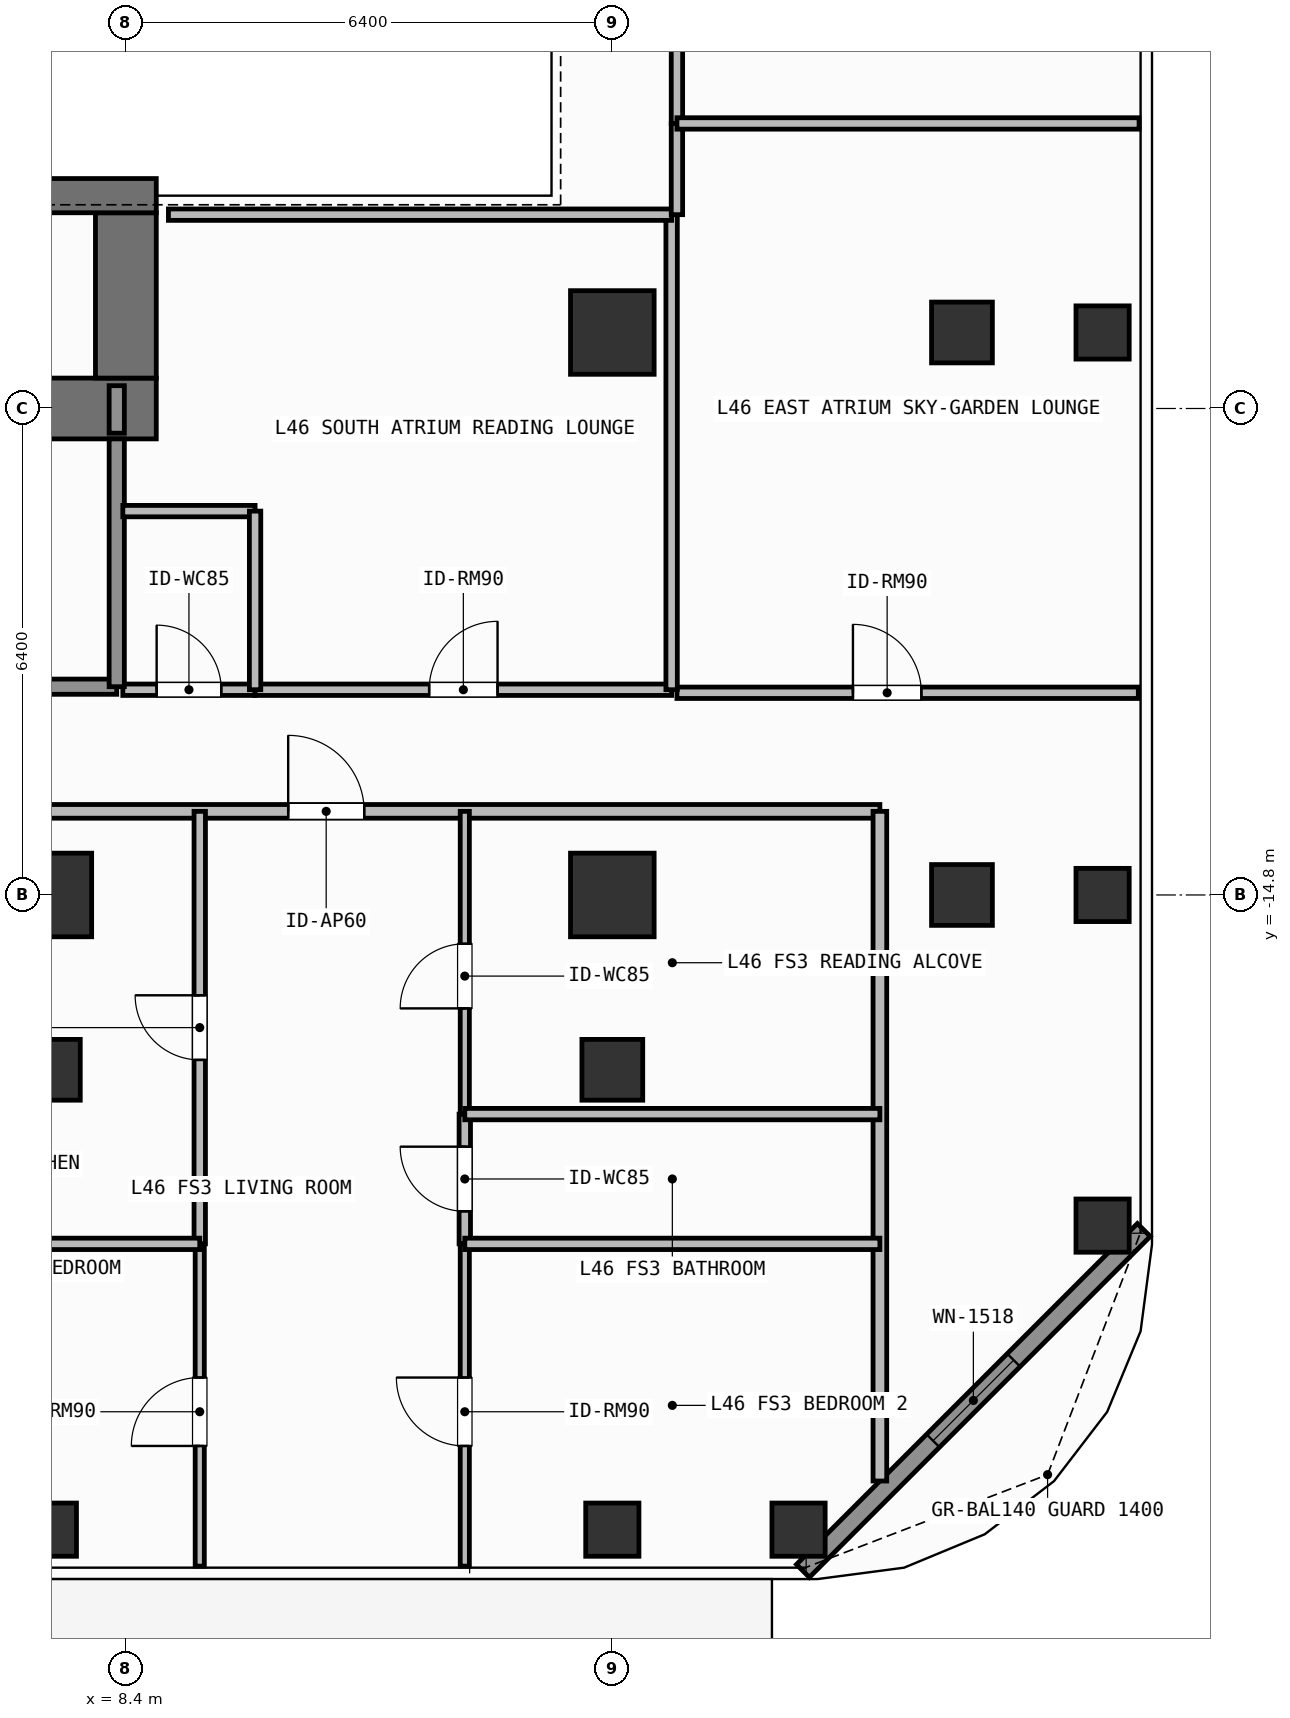
"""IFC4 building model, lengths in metres.
Left out: names, types, materials, properties, quantities, classifications, styles, units other than length and angle.
Written with IfcOpenShell. Run it as: python <this file> out.ifc"""

import sys

from ifc_helpers import new_model, si_unit, direction, frame, frame_2d, origin, origin_2d, place, context, subcontext, project, spatial, rectangle, hollow_rectangle, extrude, element, fill, save


model = new_model("IFC4")
c1 = context("Model", 3, precision=1e-05, world=origin(), true_north=direction((0.0, 1.0)))
c2 = subcontext(c1, "Body", "Model", "MODEL_VIEW")
j1 = project(units=[si_unit("LENGTHUNIT", "METRE"), si_unit("PLANEANGLEUNIT", "RADIAN")], contexts=[c1])
p1 = place(None, origin())
s1 = spatial("IfcSite", under=j1, at=p1, CompositionType="ELEMENT")
p2 = place(p1, origin())
s2 = spatial("IfcBuilding", under=s1, at=p2, CompositionType="ELEMENT")
p3 = place(p2, frame((0.0, 0.0, 187.5)))
s3 = spatial("IfcBuildingStorey", under=s2, at=p3, CompositionType="ELEMENT", Elevation=187.5)
p4 = place(p3, frame((6.12, -8.4, 0.0), z_axis=(0.0, 0.0, 1.0), x_axis=(1.0, 0.0, 0.0)))
e1 = element("IfcWall", 1, at=p4, inside=s3, PredefinedType="SHEAR", context=c2, shape_type="SweptSolid", body=[
    extrude(rectangle(XDim=2.68, YDim=0.8, at=frame_2d((1.34, 0.0))), origin(), (0.0, 0.0, 1.0), 3.9),
])
p5 = place(p3, frame((8.4, -8.0, 0.0), z_axis=(0.0, 0.0, 1.0), x_axis=(0.0, 1.0, 0.0)))
e2 = element("IfcWall", 2, at=p5, inside=s3, PredefinedType="SHEAR", context=c2, shape_type="SweptSolid", body=[
    extrude(rectangle(XDim=2.175, YDim=0.8, at=frame_2d((1.087, 0.0))), origin(), (0.0, 0.0, 1.0), 3.9),
])
p6 = place(p3, frame((3.045, -5.6, 0.0), z_axis=(0.0, 0.0, 1.0), x_axis=(1.0, 0.0, 0.0)))
e3 = element("IfcWall", 3, at=p6, inside=s3, PredefinedType="SHEAR", context=c2, shape_type="SweptSolid", body=[
    extrude(rectangle(XDim=5.755, YDim=0.45, at=frame_2d((2.877, 0.0))), origin(), (0.0, 0.0, 1.0), 3.9),
])
for number, where, z_axis, x_axis in (
    (4, (7.4, -14.8, 0.0), (0.0, 0.0, 1.0), (1.0, 0.0, 0.0)),
    (5, (14.8, -14.8, 0.0), (0.0, 0.0, 1.0), (1.0, 0.0, 0.0)),
    (6, (14.8, -7.4, 0.0), (0.0, 0.0, 1.0), (1.0, 0.0, 0.0)),
):
    element("IfcColumn", number, at=place(p3, frame(where, z_axis=z_axis, x_axis=x_axis)), inside=s3, PredefinedType="COLUMN", context=c2, shape_type="SweptSolid", body=[
        extrude(rectangle(XDim=1.1, YDim=1.1, at=origin_2d()), origin(), (0.0, 0.0, 1.0), 3.9),
    ])
for number, where, z_axis, x_axis in (
    (7, (19.4, -14.8, 0.0), (0.0, 0.0, 1.0), (1.0, 0.0, 0.0)),
    (8, (19.4, -7.4, 0.0), (0.0, 0.0, 1.0), (1.0, 0.0, 0.0)),
    (9, (7.4, -17.1, 0.0), (0.0, 0.0, 1.0), (1.0, 0.0, 0.0)),
    (10, (14.8, -17.1, 0.0), (0.0, 0.0, 1.0), (1.0, 0.0, 0.0)),
):
    element("IfcColumn", number, at=place(p3, frame(where, z_axis=z_axis, x_axis=x_axis)), inside=s3, PredefinedType="COLUMN", context=c2, shape_type="SweptSolid", body=[
        extrude(hollow_rectangle(XDim=0.8, YDim=0.8, WallThickness=0.036, at=origin_2d()), origin(), (0.0, 0.0, 1.0), 3.9),
    ])
for number, where, z_axis, x_axis in (
    (11, (17.25, -23.15, 0.0), (0.0, 0.0, 1.0), (1.0, 0.0, 0.0)),
    (12, (21.25, -19.15, 0.0), (0.0, 0.0, 1.0), (1.0, 0.0, 0.0)),
    (13, (7.4, -23.15, 0.0), (0.0, 0.0, 1.0), (1.0, 0.0, 0.0)),
    (14, (14.8, -23.15, 0.0), (0.0, 0.0, 1.0), (1.0, 0.0, 0.0)),
    (15, (21.25, -14.8, 0.0), (0.0, 0.0, 1.0), (1.0, 0.0, 0.0)),
    (16, (21.25, -7.4, 0.0), (0.0, 0.0, 1.0), (1.0, 0.0, 0.0)),
):
    element("IfcColumn", number, at=place(p3, frame(where, z_axis=z_axis, x_axis=x_axis)), inside=s3, PredefinedType="COLUMN", context=c2, shape_type="SweptSolid", body=[
        extrude(hollow_rectangle(XDim=0.7, YDim=0.7, WallThickness=0.032, at=origin_2d()), origin(), (0.0, 0.0, 1.0), 3.9),
    ])
p7 = place(p3, frame((21.792, -19.208, 0.0), z_axis=(0.0, 0.0, 1.0), x_axis=(-0.707106781187, -0.707106781187, 0.0)))
e17 = element("IfcWall", 17, at=p7, inside=s3, PredefinedType="SOLIDWALL", context=c2, shape_type="SweptSolid", body=[
    extrude(rectangle(XDim=6.343, YDim=0.24, at=frame_2d((3.171, 0.0))), origin(), (0.0, 0.0, 1.0), 3.62),
])
p8 = place(p7, frame((2.421, 0.0, 0.8)))
e18 = element("IfcOpeningElement", 18, at=p8, cuts=e17, PredefinedType="OPENING", context=c2, shape_type="SweptSolid", body=[
    extrude(rectangle(XDim=1.5, YDim=1.85, at=frame_2d((0.75, 0.925))), frame((0.0, 0.13, 0.0), z_axis=(0.0, -1.0, 0.0), x_axis=(1.0, 0.0, 0.0)), (0.0, 0.0, 1.0), 0.26),
])
p9 = place(p3, frame((4.58, -12.06, 0.0), z_axis=(0.0, 0.0, 1.0), x_axis=(1.0, 0.0, 0.0)))
e19 = element("IfcWall", 19, at=p9, inside=s3, PredefinedType="SOLIDWALL", context=c2, shape_type="SweptSolid", body=[
    extrude(rectangle(XDim=3.7, YDim=0.2, at=frame_2d((1.85, 0.0))), origin(), (0.0, 0.0, 1.0), 3.62),
])
p10 = place(p9, frame((1.212, 0.0, 0.0)))
e20 = element("IfcOpeningElement", 20, at=p10, cuts=e19, PredefinedType="OPENING", context=c2, shape_type="SweptSolid", body=[
    extrude(rectangle(XDim=1.1, YDim=2.15, at=frame_2d((0.55, 1.075))), frame((0.0, 0.11, 0.0), z_axis=(0.0, -1.0, 0.0), x_axis=(1.0, 0.0, 0.0)), (0.0, 0.0, 1.0), 0.22),
])
p11 = place(p3, frame((8.36, -12.1, 0.0), z_axis=(0.0, 0.0, 1.0), x_axis=(1.0, 0.0, 0.0)))
e21 = element("IfcWall", 21, at=p11, inside=s3, PredefinedType="PARTITIONING", context=c2, shape_type="SweptSolid", body=[
    extrude(rectangle(XDim=1.74, YDim=0.15, at=frame_2d((0.87, 0.0))), origin(), (0.0, 0.0, 1.0), 3.62),
])
p12 = place(p11, frame((0.445, 0.0, 0.0)))
e22 = element("IfcOpeningElement", 22, at=p12, cuts=e21, PredefinedType="OPENING", context=c2, shape_type="SweptSolid", body=[
    extrude(rectangle(XDim=0.85, YDim=2.1, at=frame_2d((0.425, 1.05))), frame((0.0, 0.085, 0.0), z_axis=(0.0, -1.0, 0.0), x_axis=(1.0, 0.0, 0.0)), (0.0, 0.0, 1.0), 0.17),
])
p13 = place(p3, frame((10.1, -12.1, 0.0), z_axis=(0.0, 0.0, 1.0), x_axis=(1.0, 0.0, 0.0)))
e23 = element("IfcWall", 23, at=p13, inside=s3, PredefinedType="PARTITIONING", context=c2, shape_type="SweptSolid", body=[
    extrude(rectangle(XDim=5.48, YDim=0.15, at=frame_2d((2.74, 0.0))), origin(), (0.0, 0.0, 1.0), 3.62),
])
p14 = place(p13, frame((2.29, 0.0, 0.0)))
e24 = element("IfcOpeningElement", 24, at=p14, cuts=e23, PredefinedType="OPENING", context=c2, shape_type="SweptSolid", body=[
    extrude(rectangle(XDim=0.9, YDim=2.1, at=frame_2d((0.45, 1.05))), frame((0.0, 0.085, 0.0), z_axis=(0.0, -1.0, 0.0), x_axis=(1.0, 0.0, 0.0)), (0.0, 0.0, 1.0), 0.17),
])
p15 = place(p3, frame((3.93, -13.7, 0.0), z_axis=(0.0, 0.0, 1.0), x_axis=(1.0, 0.0, 0.0)))
e25 = element("IfcWall", 25, at=p15, inside=s3, PredefinedType="PARTITIONING", context=c2, shape_type="SweptSolid", body=[
    extrude(rectangle(XDim=14.39, YDim=0.18, at=frame_2d((7.195, 0.0))), origin(), (0.0, 0.0, 1.0), 3.62),
])
p16 = place(p15, frame((6.605, 0.0, 0.0)))
e26 = element("IfcOpeningElement", 26, at=p16, cuts=e25, PredefinedType="OPENING", context=c2, shape_type="SweptSolid", body=[
    extrude(rectangle(XDim=1.0, YDim=2.2, at=frame_2d((0.5, 1.1))), frame((0.0, 0.1, 0.0), z_axis=(0.0, -1.0, 0.0), x_axis=(1.0, 0.0, 0.0)), (0.0, 0.0, 1.0), 0.2),
])
p17 = place(p3, frame((9.372, -19.39, 0.0), z_axis=(0.0, 0.0, 1.0), x_axis=(0.0, 1.0, 0.0)))
e27 = element("IfcWall", 27, at=p17, inside=s3, PredefinedType="PARTITIONING", context=c2, shape_type="SweptSolid", body=[
    extrude(rectangle(XDim=5.69, YDim=0.15, at=frame_2d((2.845, 0.0))), origin(), (0.0, 0.0, 1.0), 3.62),
])
p18 = place(p17, frame((2.42, 0.0, 0.0)))
e28 = element("IfcOpeningElement", 28, at=p18, cuts=e27, PredefinedType="OPENING", context=c2, shape_type="SweptSolid", body=[
    extrude(rectangle(XDim=0.85, YDim=2.1, at=frame_2d((0.425, 1.05))), frame((0.0, 0.085, 0.0), z_axis=(0.0, -1.0, 0.0), x_axis=(1.0, 0.0, 0.0)), (0.0, 0.0, 1.0), 0.17),
])
p19 = place(p3, frame((9.372, -23.63, 0.0), z_axis=(0.0, 0.0, 1.0), x_axis=(0.0, 1.0, 0.0)))
e29 = element("IfcWall", 29, at=p19, inside=s3, PredefinedType="PARTITIONING", context=c2, shape_type="SweptSolid", body=[
    extrude(rectangle(XDim=4.24, YDim=0.12, at=frame_2d((2.12, 0.0))), origin(), (0.0, 0.0, 1.0), 3.62),
])
p20 = place(p19, frame((1.581, 0.0, 0.0)))
e30 = element("IfcOpeningElement", 30, at=p20, cuts=e29, PredefinedType="OPENING", context=c2, shape_type="SweptSolid", body=[
    extrude(rectangle(XDim=0.9, YDim=2.1, at=frame_2d((0.45, 1.05))), frame((0.0, 0.07, 0.0), z_axis=(0.0, -1.0, 0.0), x_axis=(1.0, 0.0, 0.0)), (0.0, 0.0, 1.0), 0.14),
])
p21 = place(p3, frame((12.859, -19.39, 0.0), z_axis=(0.0, 0.0, 1.0), x_axis=(0.0, 1.0, 0.0)))
e31 = element("IfcWall", 31, at=p21, inside=s3, PredefinedType="PARTITIONING", context=c2, shape_type="SweptSolid", body=[
    extrude(rectangle(XDim=1.707, YDim=0.15, at=frame_2d((0.854, 0.0))), origin(), (0.0, 0.0, 1.0), 3.62),
])
p22 = place(p21, frame((0.428, 0.0, 0.0)))
e32 = element("IfcOpeningElement", 32, at=p22, cuts=e31, PredefinedType="OPENING", context=c2, shape_type="SweptSolid", body=[
    extrude(rectangle(XDim=0.85, YDim=2.1, at=frame_2d((0.425, 1.05))), frame((0.0, 0.085, 0.0), z_axis=(0.0, -1.0, 0.0), x_axis=(1.0, 0.0, 0.0)), (0.0, 0.0, 1.0), 0.17),
])
p23 = place(p3, frame((12.859, -17.683, 0.0), z_axis=(0.0, 0.0, 1.0), x_axis=(0.0, 1.0, 0.0)))
e33 = element("IfcWall", 33, at=p23, inside=s3, PredefinedType="PARTITIONING", context=c2, shape_type="SweptSolid", body=[
    extrude(rectangle(XDim=3.983, YDim=0.12, at=frame_2d((1.992, 0.0))), origin(), (0.0, 0.0, 1.0), 3.62),
])
p24 = place(p23, frame((1.391, 0.0, 0.0)))
e34 = element("IfcOpeningElement", 34, at=p24, cuts=e33, PredefinedType="OPENING", context=c2, shape_type="SweptSolid", body=[
    extrude(rectangle(XDim=0.85, YDim=2.1, at=frame_2d((0.425, 1.05))), frame((0.0, 0.07, 0.0), z_axis=(0.0, -1.0, 0.0), x_axis=(1.0, 0.0, 0.0)), (0.0, 0.0, 1.0), 0.14),
])
p25 = place(p3, frame((12.859, -23.63, 0.0), z_axis=(0.0, 0.0, 1.0), x_axis=(0.0, 1.0, 0.0)))
e35 = element("IfcWall", 35, at=p25, inside=s3, PredefinedType="PARTITIONING", context=c2, shape_type="SweptSolid", body=[
    extrude(rectangle(XDim=4.24, YDim=0.12, at=frame_2d((2.12, 0.0))), origin(), (0.0, 0.0, 1.0), 3.62),
])
p26 = place(p25, frame((1.581, 0.0, 0.0)))
e36 = element("IfcOpeningElement", 36, at=p26, cuts=e35, PredefinedType="OPENING", context=c2, shape_type="SweptSolid", body=[
    extrude(rectangle(XDim=0.9, YDim=2.1, at=frame_2d((0.45, 1.05))), frame((0.0, 0.07, 0.0), z_axis=(0.0, -1.0, 0.0), x_axis=(1.0, 0.0, 0.0)), (0.0, 0.0, 1.0), 0.14),
])
p27 = place(p3, frame((15.65, -12.14, 0.0), z_axis=(0.0, 0.0, 1.0), x_axis=(1.0, 0.0, 0.0)))
e37 = element("IfcWall", 37, at=p27, inside=s3, PredefinedType="PARTITIONING", context=c2, shape_type="SweptSolid", body=[
    extrude(rectangle(XDim=6.07, YDim=0.15, at=frame_2d((3.035, 0.0))), origin(), (0.0, 0.0, 1.0), 3.62),
])
p28 = place(p27, frame((2.316, 0.0, 0.0)))
e38 = element("IfcOpeningElement", 38, at=p28, cuts=e37, PredefinedType="OPENING", context=c2, shape_type="SweptSolid", body=[
    extrude(rectangle(XDim=0.9, YDim=2.1, at=frame_2d((0.45, 1.05))), frame((0.0, 0.085, 0.0), z_axis=(0.0, -1.0, 0.0), x_axis=(1.0, 0.0, 0.0)), (0.0, 0.0, 1.0), 0.17),
])
p29 = place(p3, frame((8.28, -12.06, 0.0), z_axis=(0.0, 0.0, 1.0), x_axis=(0.0, 1.0, 0.0)))
e39 = element("IfcWall", 39, at=p29, inside=s3, PredefinedType="SOLIDWALL", context=c2, shape_type="SweptSolid", body=[
    extrude(rectangle(XDim=3.26, YDim=0.2, at=frame_2d((1.63, 0.0))), origin(), (0.0, 0.0, 1.0), 3.62),
])
p30 = place(p3, frame((8.28, -8.725, 0.0), z_axis=(0.0, 0.0, 1.0), x_axis=(0.0, 1.0, 0.0)))
e40 = element("IfcWall", 40, at=p30, inside=s3, PredefinedType="SOLIDWALL", context=c2, shape_type="SweptSolid", body=[
    extrude(rectangle(XDim=0.625, YDim=0.2, at=frame_2d((0.312, 0.0))), origin(), (0.0, 0.0, 1.0), 3.62),
])
p31 = place(p3, frame((8.36, -9.75, 0.0), z_axis=(0.0, 0.0, 1.0), x_axis=(1.0, 0.0, 0.0)))
e41 = element("IfcWall", 41, at=p31, inside=s3, PredefinedType="PARTITIONING", context=c2, shape_type="SweptSolid", body=[
    extrude(rectangle(XDim=1.74, YDim=0.15, at=frame_2d((0.87, 0.0))), origin(), (0.0, 0.0, 1.0), 3.62),
])
p32 = place(p3, frame((10.1, -12.1, 0.0), z_axis=(0.0, 0.0, 1.0), x_axis=(0.0, 1.0, 0.0)))
e42 = element("IfcWall", 42, at=p32, inside=s3, PredefinedType="PARTITIONING", context=c2, shape_type="SweptSolid", body=[
    extrude(rectangle(XDim=2.35, YDim=0.15, at=frame_2d((1.175, 0.0))), origin(), (0.0, 0.0, 1.0), 3.62),
])
p33 = place(p3, frame((15.58, -12.1, 0.0), z_axis=(0.0, 0.0, 1.0), x_axis=(0.0, 1.0, 0.0)))
e43 = element("IfcWall", 43, at=p33, inside=s3, PredefinedType="PARTITIONING", context=c2, shape_type="SweptSolid", body=[
    extrude(rectangle(XDim=6.25, YDim=0.15, at=frame_2d((3.125, 0.0))), origin(), (0.0, 0.0, 1.0), 3.62),
])
p34 = place(p3, frame((8.96, -5.85, 0.0), z_axis=(0.0, 0.0, 1.0), x_axis=(1.0, 0.0, 0.0)))
e44 = element("IfcWall", 44, at=p34, inside=s3, PredefinedType="PARTITIONING", context=c2, shape_type="SweptSolid", body=[
    extrude(rectangle(XDim=6.62, YDim=0.15, at=frame_2d((3.31, 0.0))), origin(), (0.0, 0.0, 1.0), 3.62),
])
p35 = place(p3, frame((18.32, -22.51, 0.0), z_axis=(0.0, 0.0, 1.0), x_axis=(0.0, 1.0, 0.0)))
e45 = element("IfcWall", 45, at=p35, inside=s3, PredefinedType="PARTITIONING", context=c2, shape_type="SweptSolid", body=[
    extrude(rectangle(XDim=8.81, YDim=0.18, at=frame_2d((4.405, 0.0))), origin(), (0.0, 0.0, 1.0), 3.62),
])
p36 = place(p3, frame((3.93, -19.39, 0.0), z_axis=(0.0, 0.0, 1.0), x_axis=(1.0, 0.0, 0.0)))
e46 = element("IfcWall", 46, at=p36, inside=s3, PredefinedType="PARTITIONING", context=c2, shape_type="SweptSolid", body=[
    extrude(rectangle(XDim=5.442, YDim=0.15, at=frame_2d((2.721, 0.0))), origin(), (0.0, 0.0, 1.0), 3.62),
])
for number, where, z_axis, x_axis in (
    (47, (12.859, -17.683, 0.0), (0.0, 0.0, 1.0), (1.0, 0.0, 0.0)),
    (48, (12.859, -19.39, 0.0), (0.0, 0.0, 1.0), (1.0, 0.0, 0.0)),
):
    element("IfcWall", number, at=place(p3, frame(where, z_axis=z_axis, x_axis=x_axis)), inside=s3, PredefinedType="PARTITIONING", context=c2, shape_type="SweptSolid", body=[
        extrude(rectangle(XDim=5.461, YDim=0.15, at=frame_2d((2.73, 0.0))), origin(), (0.0, 0.0, 1.0), 3.62),
    ])
p37 = place(p3, frame((15.65, -5.85, 0.0), z_axis=(0.0, 0.0, 1.0), x_axis=(0.0, 1.0, 0.0)))
e49 = element("IfcWall", 49, at=p37, inside=s3, PredefinedType="PARTITIONING", context=c2, shape_type="SweptSolid", body=[
    extrude(rectangle(XDim=1.2, YDim=0.15, at=frame_2d((0.6, 0.0))), origin(), (0.0, 0.0, 1.0), 3.62),
])
p38 = place(p3, frame((15.65, -4.65, 0.0), z_axis=(0.0, 0.0, 1.0), x_axis=(0.0, 1.0, 0.0)))
e50 = element("IfcWall", 50, at=p38, inside=s3, PredefinedType="PARTITIONING", context=c2, shape_type="SweptSolid", body=[
    extrude(rectangle(XDim=10.5, YDim=0.15, at=frame_2d((5.25, 0.0))), origin(), (0.0, 0.0, 1.0), 3.62),
])
p39 = place(p3, frame((15.65, -4.65, 0.0), z_axis=(0.0, 0.0, 1.0), x_axis=(1.0, 0.0, 0.0)))
e51 = element("IfcWall", 51, at=p39, inside=s3, PredefinedType="PARTITIONING", context=c2, shape_type="SweptSolid", body=[
    extrude(rectangle(XDim=6.08, YDim=0.15, at=frame_2d((3.04, 0.0))), origin(), (0.0, 0.0, 1.0), 3.62),
])
p40 = place(p8, origin())
e52 = element("IfcWindow", 52, at=p40, inside=s3, PartitioningType="SINGLE_PANEL", PredefinedType="WINDOW", context=c2, shape_type="SweptSolid", body=[
    extrude(rectangle(XDim=1.5, YDim=1.85, at=frame_2d((0.75, 0.925))), frame((0.0, 0.03, 0.0), z_axis=(0.0, -1.0, 0.0), x_axis=(1.0, 0.0, 0.0)), (0.0, 0.0, 1.0), 0.06),
])
fill(e18, e52)
p41 = place(p12, origin())
e53 = element("IfcDoor", 53, at=p41, inside=s3, OperationType="SINGLE_SWING_LEFT", PredefinedType="DOOR", context=c2, shape_type="SweptSolid", body=[
    extrude(rectangle(XDim=0.85, YDim=2.1, at=frame_2d((0.425, 1.05))), frame((0.0, 0.025, 0.0), z_axis=(0.0, -1.0, 0.0), x_axis=(1.0, 0.0, 0.0)), (0.0, 0.0, 1.0), 0.05),
])
fill(e22, e53)
p42 = place(p14, origin())
e54 = element("IfcDoor", 54, at=p42, inside=s3, OperationType="SINGLE_SWING_RIGHT", PredefinedType="DOOR", context=c2, shape_type="SweptSolid", body=[
    extrude(rectangle(XDim=0.9, YDim=2.1, at=frame_2d((0.45, 1.05))), frame((0.0, 0.025, 0.0), z_axis=(0.0, -1.0, 0.0), x_axis=(1.0, 0.0, 0.0)), (0.0, 0.0, 1.0), 0.05),
])
fill(e24, e54)
p43 = place(p16, origin())
e55 = element("IfcDoor", 55, at=p43, inside=s3, OperationType="SINGLE_SWING_LEFT", PredefinedType="DOOR", context=c2, shape_type="SweptSolid", body=[
    extrude(rectangle(XDim=1.0, YDim=2.2, at=frame_2d((0.5, 1.1))), frame((0.0, 0.025, 0.0), z_axis=(0.0, -1.0, 0.0), x_axis=(1.0, 0.0, 0.0)), (0.0, 0.0, 1.0), 0.05),
])
fill(e26, e55)
p44 = place(p18, origin())
e56 = element("IfcDoor", 56, at=p44, inside=s3, OperationType="SINGLE_SWING_RIGHT", PredefinedType="DOOR", context=c2, shape_type="SweptSolid", body=[
    extrude(rectangle(XDim=0.85, YDim=2.1, at=frame_2d((0.425, 1.05))), frame((0.0, 0.025, 0.0), z_axis=(0.0, -1.0, 0.0), x_axis=(1.0, 0.0, 0.0)), (0.0, 0.0, 1.0), 0.05),
])
fill(e28, e56)
p45 = place(p20, origin())
e57 = element("IfcDoor", 57, at=p45, inside=s3, OperationType="SINGLE_SWING_LEFT", PredefinedType="DOOR", context=c2, shape_type="SweptSolid", body=[
    extrude(rectangle(XDim=0.9, YDim=2.1, at=frame_2d((0.45, 1.05))), frame((0.0, 0.025, 0.0), z_axis=(0.0, -1.0, 0.0), x_axis=(1.0, 0.0, 0.0)), (0.0, 0.0, 1.0), 0.05),
])
fill(e30, e57)
p46 = place(p22, origin())
e58 = element("IfcDoor", 58, at=p46, inside=s3, OperationType="SINGLE_SWING_RIGHT", PredefinedType="DOOR", context=c2, shape_type="SweptSolid", body=[
    extrude(rectangle(XDim=0.85, YDim=2.1, at=frame_2d((0.425, 1.05))), frame((0.0, 0.025, 0.0), z_axis=(0.0, -1.0, 0.0), x_axis=(1.0, 0.0, 0.0)), (0.0, 0.0, 1.0), 0.05),
])
fill(e32, e58)
p47 = place(p24, origin())
e59 = element("IfcDoor", 59, at=p47, inside=s3, OperationType="SINGLE_SWING_LEFT", PredefinedType="DOOR", context=c2, shape_type="SweptSolid", body=[
    extrude(rectangle(XDim=0.85, YDim=2.1, at=frame_2d((0.425, 1.05))), frame((0.0, 0.025, 0.0), z_axis=(0.0, -1.0, 0.0), x_axis=(1.0, 0.0, 0.0)), (0.0, 0.0, 1.0), 0.05),
])
fill(e34, e59)
p48 = place(p26, origin())
e60 = element("IfcDoor", 60, at=p48, inside=s3, OperationType="SINGLE_SWING_RIGHT", PredefinedType="DOOR", context=c2, shape_type="SweptSolid", body=[
    extrude(rectangle(XDim=0.9, YDim=2.1, at=frame_2d((0.45, 1.05))), frame((0.0, 0.025, 0.0), z_axis=(0.0, -1.0, 0.0), x_axis=(1.0, 0.0, 0.0)), (0.0, 0.0, 1.0), 0.05),
])
fill(e36, e60)
p49 = place(p28, origin())
e61 = element("IfcDoor", 61, at=p49, inside=s3, OperationType="SINGLE_SWING_LEFT", PredefinedType="DOOR", context=c2, shape_type="SweptSolid", body=[
    extrude(rectangle(XDim=0.9, YDim=2.1, at=frame_2d((0.45, 1.05))), frame((0.0, 0.025, 0.0), z_axis=(0.0, -1.0, 0.0), x_axis=(1.0, 0.0, 0.0)), (0.0, 0.0, 1.0), 0.05),
])
fill(e38, e61)
save(model, sys.argv[1])
